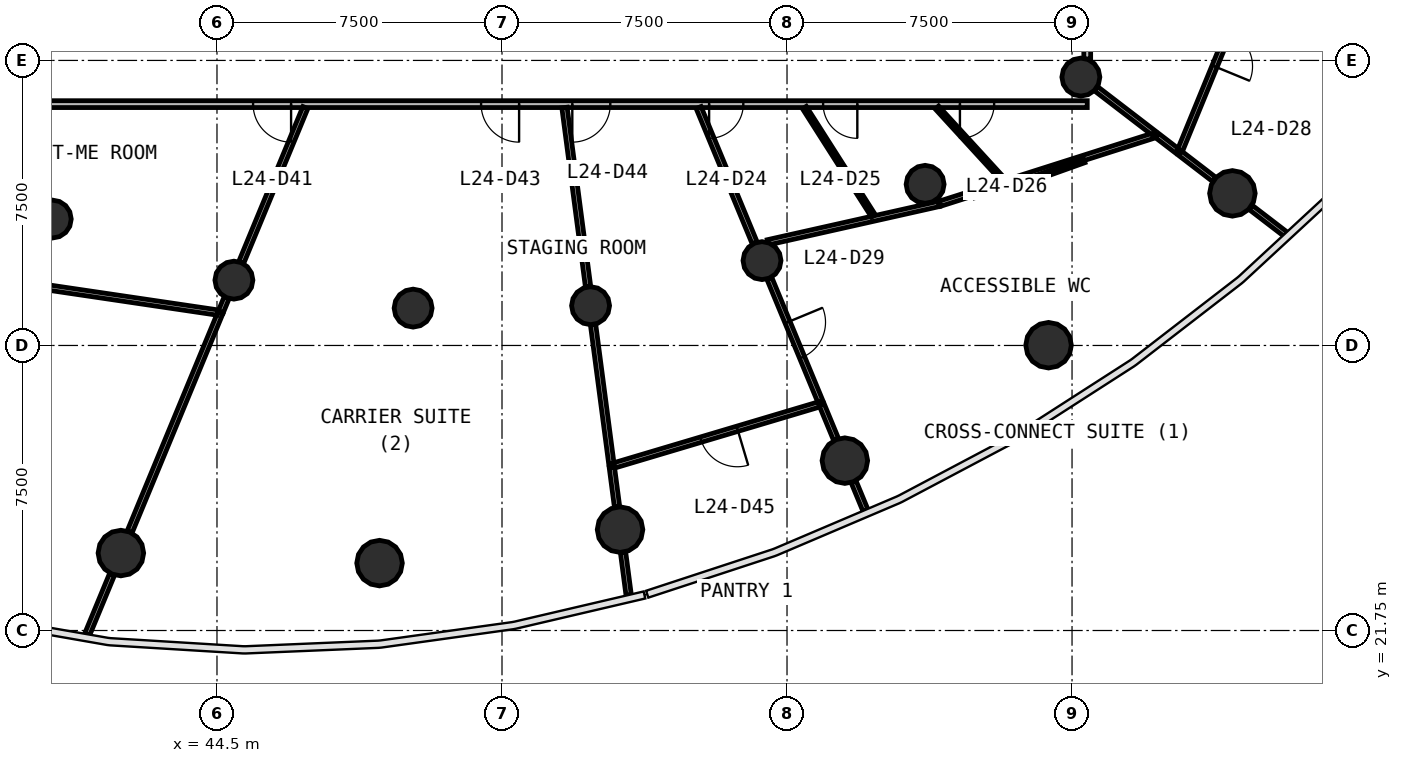
"""IFC4 building model, lengths in metres.
Left out: names, types, materials, properties, quantities, classifications, styles, units other than length and angle.
Written with IfcOpenShell. Run it as: python <this file> out.ifc"""

import sys

from ifc_helpers import new_model, si_unit, direction, frame, frame_2d, origin, origin_2d, place, context, subcontext, project, spatial, rectangle, circle, extrude, source, transform, mapped, element, fill, save


model = new_model("IFC4")
c1 = context("Model", 3, precision=1e-05, world=origin(), true_north=direction((0.0, 1.0)))
c2 = subcontext(c1, "Body", "Model", "MODEL_VIEW")
j1 = project(units=[si_unit("LENGTHUNIT", "METRE"), si_unit("PLANEANGLEUNIT", "RADIAN")], contexts=[c1])
p1 = place(None, origin())
s1 = spatial("IfcSite", under=j1, at=p1, CompositionType="ELEMENT")
p2 = place(p1, origin())
s2 = spatial("IfcBuilding", under=s1, at=p2, CompositionType="ELEMENT")
p3 = place(p2, frame((0.0, 0.0, 104.4)))
s3 = spatial("IfcBuildingStorey", under=s2, at=p3, CompositionType="ELEMENT", Elevation=104.4)
m1 = source(origin(), c2, "Body", "SweptSolid", [
    extrude(circle(Radius=0.6, at=origin_2d()), origin(), (0.0, 0.0, 1.0), 4.1),
])
for number, where, z_axis, x_axis in (
    (1, (41.971, 23.788, 0.0), (0.0, 0.0, 1.0), (1.0, 0.0, 0.0)),
    (2, (48.778, 23.523, 0.0), (0.0, 0.0, 1.0), (1.0, 0.0, 0.0)),
    (3, (55.106, 24.405, 0.0), (0.0, 0.0, 1.0), (1.0, 0.0, 0.0)),
    (4, (61.022, 26.219, 0.0), (0.0, 0.0, 1.0), (1.0, 0.0, 0.0)),
    (5, (66.382, 29.257, 0.0), (0.0, 0.0, 1.0), (1.0, 0.0, 0.0)),
    (6, (71.22, 33.252, 0.0), (0.0, 0.0, 1.0), (1.0, 0.0, 0.0)),
):
    element("IfcColumn", number, at=place(p3, frame(where, z_axis=z_axis, x_axis=x_axis)), inside=s3, PredefinedType="COLUMN", context=c2, shape_type="MappedRepresentation", body=[
        mapped(m1, transform((0.0, 0.0, 0.0), scale=1.0)),
    ])
m2 = source(origin(), c2, "Body", "SweptSolid", [
    extrude(circle(Radius=0.5, at=origin_2d()), origin(), (0.0, 0.0, 1.0), 4.1),
])
for number, where, z_axis, x_axis in (
    (7, (40.165, 32.576, 0.0), (0.0, 0.0, 1.0), (1.0, 0.0, 0.0)),
    (8, (44.945, 30.969, 0.0), (0.0, 0.0, 1.0), (1.0, 0.0, 0.0)),
    (9, (49.661, 30.233, 0.0), (0.0, 0.0, 1.0), (1.0, 0.0, 0.0)),
    (10, (54.331, 30.297, 0.0), (0.0, 0.0, 1.0), (1.0, 0.0, 0.0)),
    (11, (58.842, 31.482, 0.0), (0.0, 0.0, 1.0), (1.0, 0.0, 0.0)),
    (12, (63.134, 33.49, 0.0), (0.0, 0.0, 1.0), (1.0, 0.0, 0.0)),
    (13, (67.232, 36.312, 0.0), (0.0, 0.0, 1.0), (1.0, 0.0, 0.0)),
):
    element("IfcColumn", number, at=place(p3, frame(where, z_axis=z_axis, x_axis=x_axis)), inside=s3, PredefinedType="COLUMN", context=c2, shape_type="MappedRepresentation", body=[
        mapped(m2, transform((0.0, 0.0, 0.0), scale=1.0)),
    ])
p4 = place(p3, frame((67.4, 35.6, 0.0), z_axis=(0.0, 0.0, 1.0), x_axis=(-1.0, 0.0, 0.0)))
e14 = element("IfcWall", 14, at=p4, inside=s3, PredefinedType="PARTITIONING", context=c2, shape_type="SweptSolid", body=[
    extrude(rectangle(XDim=30.8, YDim=0.18, at=frame_2d((15.4, 0.0))), origin(), (0.0, 0.0, 1.0), 2.9),
])
p5 = place(p4, frame((9.05, 0.0, 0.0)))
e15 = element("IfcOpeningElement", 15, at=p5, cuts=e14, PredefinedType="OPENING", context=c2, shape_type="SweptSolid", body=[
    extrude(rectangle(XDim=0.9, YDim=2.1, at=frame_2d((0.45, 1.05))), frame((0.0, 0.1, 0.0), z_axis=(0.0, -1.0, 0.0), x_axis=(1.0, 0.0, 0.0)), (0.0, 0.0, 1.0), 0.2),
])
p6 = place(p4, frame((6.05, 0.0, 0.0)))
e16 = element("IfcOpeningElement", 16, at=p6, cuts=e14, PredefinedType="OPENING", context=c2, shape_type="SweptSolid", body=[
    extrude(rectangle(XDim=0.9, YDim=2.1, at=frame_2d((0.45, 1.05))), frame((0.0, 0.1, 0.0), z_axis=(0.0, -1.0, 0.0), x_axis=(1.0, 0.0, 0.0)), (0.0, 0.0, 1.0), 0.2),
])
p7 = place(p4, frame((2.45, 0.0, 0.0)))
e17 = element("IfcOpeningElement", 17, at=p7, cuts=e14, PredefinedType="OPENING", context=c2, shape_type="SweptSolid", body=[
    extrude(rectangle(XDim=0.9, YDim=2.1, at=frame_2d((0.45, 1.05))), frame((0.0, 0.1, 0.0), z_axis=(0.0, -1.0, 0.0), x_axis=(1.0, 0.0, 0.0)), (0.0, 0.0, 1.0), 0.2),
])
p8 = place(p4, frame((20.95, 0.0, 0.0)))
e18 = element("IfcOpeningElement", 18, at=p8, cuts=e14, PredefinedType="OPENING", context=c2, shape_type="SweptSolid", body=[
    extrude(rectangle(XDim=1.0, YDim=2.1, at=frame_2d((0.5, 1.05))), frame((0.0, 0.1, 0.0), z_axis=(0.0, -1.0, 0.0), x_axis=(1.0, 0.0, 0.0)), (0.0, 0.0, 1.0), 0.2),
])
p9 = place(p4, frame((14.95, 0.0, 0.0)))
e19 = element("IfcOpeningElement", 19, at=p9, cuts=e14, PredefinedType="OPENING", context=c2, shape_type="SweptSolid", body=[
    extrude(rectangle(XDim=1.0, YDim=2.1, at=frame_2d((0.5, 1.05))), frame((0.0, 0.1, 0.0), z_axis=(0.0, -1.0, 0.0), x_axis=(1.0, 0.0, 0.0)), (0.0, 0.0, 1.0), 0.2),
])
p10 = place(p4, frame((12.55, 0.0, 0.0)))
e20 = element("IfcOpeningElement", 20, at=p10, cuts=e14, PredefinedType="OPENING", context=c2, shape_type="SweptSolid", body=[
    extrude(rectangle(XDim=1.0, YDim=2.1, at=frame_2d((0.5, 1.05))), frame((0.0, 0.1, 0.0), z_axis=(0.0, -1.0, 0.0), x_axis=(1.0, 0.0, 0.0)), (0.0, 0.0, 1.0), 0.2),
])
p11 = place(p3, frame((67.4, 60.37, 0.0), z_axis=(0.0, 0.0, 1.0), x_axis=(0.0, -1.0, 0.0)))
e21 = element("IfcWall", 21, at=p11, inside=s3, PredefinedType="PARTITIONING", context=c2, shape_type="SweptSolid", body=[
    extrude(rectangle(XDim=23.583, YDim=0.18, at=frame_2d((11.791, 0.0))), origin(), (0.0, 0.0, 1.0), 2.9),
])
p12 = place(p11, frame((14.732, 0.0, 0.0)))
e22 = element("IfcOpeningElement", 22, at=p12, cuts=e21, PredefinedType="OPENING", context=c2, shape_type="SweptSolid", body=[
    extrude(rectangle(XDim=1.0, YDim=2.1, at=frame_2d((0.5, 1.05))), frame((0.0, 0.1, 0.0), z_axis=(0.0, -1.0, 0.0), x_axis=(1.0, 0.0, 0.0)), (0.0, 0.0, 1.0), 0.2),
])
p13 = place(p11, frame((11.333, 0.0, 0.0)))
e23 = element("IfcOpeningElement", 23, at=p13, cuts=e21, PredefinedType="OPENING", context=c2, shape_type="SweptSolid", body=[
    extrude(rectangle(XDim=1.0, YDim=2.1, at=frame_2d((0.5, 1.05))), frame((0.0, 0.1, 0.0), z_axis=(0.0, -1.0, 0.0), x_axis=(1.0, 0.0, 0.0)), (0.0, 0.0, 1.0), 0.2),
])
p14 = place(p11, frame((4.532, 0.0, 0.0)))
e24 = element("IfcOpeningElement", 24, at=p14, cuts=e21, PredefinedType="OPENING", context=c2, shape_type="SweptSolid", body=[
    extrude(rectangle(XDim=1.0, YDim=2.1, at=frame_2d((0.5, 1.05))), frame((0.0, 0.1, 0.0), z_axis=(0.0, -1.0, 0.0), x_axis=(1.0, 0.0, 0.0)), (0.0, 0.0, 1.0), 0.2),
])
p15 = place(p3, frame((44.588, 30.106, 0.0), z_axis=(0.0, 0.0, 1.0), x_axis=(-0.382687319502, -0.923877922397, 0.0)))
e25 = element("IfcWall", 25, at=p15, inside=s3, PredefinedType="PARTITIONING", context=c2, shape_type="SweptSolid", body=[
    extrude(rectangle(XDim=6.234, YDim=0.14, at=frame_2d((3.117, 0.0))), origin(), (0.0, 0.0, 1.0), 2.9),
])
p16 = place(p3, frame((63.525, 32.98, 0.0), z_axis=(0.0, 0.0, 1.0), x_axis=(0.952796236259, 0.303610494172, 0.0)))
e26 = element("IfcWall", 26, at=p16, inside=s3, PredefinedType="PARTITIONING", context=c2, shape_type="SweptSolid", body=[
    extrude(rectangle(XDim=5.969, YDim=0.14, at=frame_2d((2.984, 0.0))), origin(), (0.0, 0.0, 1.0), 2.9),
])
p17 = place(p3, frame((72.028, 39.704, 0.0), z_axis=(0.0, 0.0, 1.0), x_axis=(-0.380042060719, -0.92496920602, 0.0)))
e27 = element("IfcWall", 27, at=p17, inside=s3, PredefinedType="PARTITIONING", context=c2, shape_type="SweptSolid", body=[
    extrude(rectangle(XDim=5.813, YDim=0.14, at=frame_2d((2.907, 0.0))), origin(), (0.0, 0.0, 1.0), 2.9),
])
p18 = place(p17, frame((2.363, 0.0, 0.0)))
e28 = element("IfcOpeningElement", 28, at=p18, cuts=e27, PredefinedType="OPENING", context=c2, shape_type="SweptSolid", body=[
    extrude(rectangle(XDim=1.0, YDim=2.1, at=frame_2d((0.5, 1.05))), frame((0.0, 0.08, 0.0), z_axis=(0.0, -1.0, 0.0), x_axis=(1.0, 0.0, 0.0)), (0.0, 0.0, 1.0), 0.16),
])
p19 = place(p3, frame((60.402, 27.716, 0.0), z_axis=(0.0, 0.0, 1.0), x_axis=(-0.958396549516, -0.285440105584, 0.0)))
e29 = element("IfcWall", 29, at=p19, inside=s3, PredefinedType="PARTITIONING", context=c2, shape_type="SweptSolid", body=[
    extrude(rectangle(XDim=5.755, YDim=0.14, at=frame_2d((2.877, 0.0))), origin(), (0.0, 0.0, 1.0), 2.9),
])
p20 = place(p19, frame((2.304, 0.0, 0.0)))
e30 = element("IfcOpeningElement", 30, at=p20, cuts=e29, PredefinedType="OPENING", context=c2, shape_type="SweptSolid", body=[
    extrude(rectangle(XDim=1.0, YDim=2.1, at=frame_2d((0.5, 1.05))), frame((0.0, 0.08, 0.0), z_axis=(0.0, -1.0, 0.0), x_axis=(1.0, 0.0, 0.0)), (0.0, 0.0, 1.0), 0.16),
])
p21 = place(p3, frame((38.943, 30.94, 0.0), z_axis=(0.0, 0.0, 1.0), x_axis=(0.98924251215, -0.146284832283, 0.0)))
e31 = element("IfcWall", 31, at=p21, inside=s3, PredefinedType="PARTITIONING", context=c2, shape_type="SweptSolid", body=[
    extrude(rectangle(XDim=5.634, YDim=0.14, at=frame_2d((2.817, 0.0))), origin(), (0.0, 0.0, 1.0), 2.9),
])
p22 = place(p3, frame((53.644, 35.51, 0.0), z_axis=(0.0, 0.0, 1.0), x_axis=(0.130548834981, -0.991441880135, 0.0)))
e32 = element("IfcWall", 32, at=p22, inside=s3, PredefinedType="PARTITIONING", context=c2, shape_type="SweptSolid", body=[
    extrude(rectangle(XDim=4.754, YDim=0.14, at=frame_2d((2.377, 0.0))), origin(), (0.0, 0.0, 1.0), 2.9),
])
p23 = place(p3, frame((58.994, 31.964, 0.0), z_axis=(0.0, 0.0, 1.0), x_axis=(0.975726638185, 0.218992071856, 0.0)))
e33 = element("IfcWall", 33, at=p23, inside=s3, PredefinedType="PARTITIONING", context=c2, shape_type="SweptSolid", body=[
    extrude(rectangle(XDim=4.613, YDim=0.14, at=frame_2d((2.307, 0.0))), origin(), (0.0, 0.0, 1.0), 2.9),
])
p24 = place(p3, frame((46.826, 35.51, 0.0), z_axis=(0.0, 0.0, 1.0), x_axis=(-0.382672831764, -0.923883923353, 0.0)))
e34 = element("IfcWall", 34, at=p24, inside=s3, PredefinedType="PARTITIONING", context=c2, shape_type="SweptSolid", body=[
    extrude(rectangle(XDim=4.41, YDim=0.14, at=frame_2d((2.205, 0.0))), origin(), (0.0, 0.0, 1.0), 2.9),
])
p25 = place(p3, frame((57.174, 35.51, 0.0), z_axis=(0.0, 0.0, 1.0), x_axis=(0.382644558062, -0.923895633817, 0.0)))
e35 = element("IfcWall", 35, at=p25, inside=s3, PredefinedType="PARTITIONING", context=c2, shape_type="SweptSolid", body=[
    extrude(rectangle(XDim=3.854, YDim=0.14, at=frame_2d((1.927, 0.0))), origin(), (0.0, 0.0, 1.0), 2.9),
])
p26 = place(p3, frame((54.396, 29.797, 0.0), z_axis=(0.0, 0.0, 1.0), x_axis=(0.13054879449, -0.991441885466, 0.0)))
e36 = element("IfcWall", 36, at=p26, inside=s3, PredefinedType="PARTITIONING", context=c2, shape_type="SweptSolid", body=[
    extrude(rectangle(XDim=3.684, YDim=0.14, at=frame_2d((1.842, 0.0))), origin(), (0.0, 0.0, 1.0), 2.9),
])
p27 = place(p3, frame((59.035, 31.016, 0.0), z_axis=(0.0, 0.0, 1.0), x_axis=(0.382713118167, -0.923867235691, 0.0)))
e37 = element("IfcWall", 37, at=p27, inside=s3, PredefinedType="PARTITIONING", context=c2, shape_type="SweptSolid", body=[
    extrude(rectangle(XDim=3.501, YDim=0.14, at=frame_2d((1.75, 0.0))), origin(), (0.0, 0.0, 1.0), 2.9),
])
p28 = place(p27, frame((1.25, 0.0, 0.0)))
e38 = element("IfcOpeningElement", 38, at=p28, cuts=e37, PredefinedType="OPENING", context=c2, shape_type="SweptSolid", body=[
    extrude(rectangle(XDim=1.0, YDim=2.1, at=frame_2d((0.5, 1.05))), frame((0.0, 0.08, 0.0), z_axis=(0.0, -1.0, 0.0), x_axis=(1.0, 0.0, 0.0)), (0.0, 0.0, 1.0), 0.16),
])
p29 = place(p3, frame((67.633, 36.005, 0.0), z_axis=(0.0, 0.0, 1.0), x_axis=(0.79330932609, -0.608818785139, 0.0)))
e39 = element("IfcWall", 39, at=p29, inside=s3, PredefinedType="PARTITIONING", context=c2, shape_type="SweptSolid", body=[
    extrude(rectangle(XDim=1.906, YDim=0.14, at=frame_2d((0.953, 0.0))), origin(), (0.0, 0.0, 1.0), 2.9),
])
p30 = place(p3, frame((41.74, 23.229, 0.0), z_axis=(0.0, 0.0, 1.0), x_axis=(-0.382769756697, -0.923843771077, 0.0)))
e40 = element("IfcWall", 40, at=p30, inside=s3, PredefinedType="PARTITIONING", context=c2, shape_type="SweptSolid", body=[
    extrude(rectangle(XDim=1.719, YDim=0.14, at=frame_2d((0.86, 0.0))), origin(), (0.0, 0.0, 1.0), 2.9),
])
p31 = place(p3, frame((71.699, 32.884, 0.0), z_axis=(0.0, 0.0, 1.0), x_axis=(0.793332880396, -0.608788091935, 0.0)))
e41 = element("IfcWall", 41, at=p31, inside=s3, PredefinedType="PARTITIONING", context=c2, shape_type="SweptSolid", body=[
    extrude(rectangle(XDim=1.164, YDim=0.14, at=frame_2d((0.582, 0.0))), origin(), (0.0, 0.0, 1.0), 2.9),
])
for number, where, z_axis, x_axis in (
    (42, (69.843, 34.309, 0.0), (0.0, 0.0, 1.0), (0.793, -0.609, 0.0)),
    (43, (55.185, 23.805, 0.0), (0.0, 0.0, 1.0), (0.131, -0.991, 0.0)),
):
    element("IfcWall", number, at=place(p3, frame(where, z_axis=z_axis, x_axis=x_axis)), inside=s3, PredefinedType="PARTITIONING", context=c2, shape_type="SweptSolid", body=[
        extrude(rectangle(XDim=1.131, YDim=0.14, at=frame_2d((0.566, 0.0))), origin(), (0.0, 0.0, 1.0), 2.9),
    ])
p32 = place(p3, frame((54.891, 26.044, 0.0), z_axis=(0.0, 0.0, 1.0), x_axis=(0.130562877322, -0.991440030998, 0.0)))
e44 = element("IfcWall", 44, at=p32, inside=s3, PredefinedType="PARTITIONING", context=c2, shape_type="SweptSolid", body=[
    extrude(rectangle(XDim=1.049, YDim=0.14, at=frame_2d((0.524, 0.0))), origin(), (0.0, 0.0, 1.0), 2.9),
])
p33 = place(p3, frame((60.413, 27.689, 0.0), z_axis=(0.0, 0.0, 1.0), x_axis=(0.382767514508, -0.923844700065, 0.0)))
e45 = element("IfcWall", 45, at=p33, inside=s3, PredefinedType="PARTITIONING", context=c2, shape_type="SweptSolid", body=[
    extrude(rectangle(XDim=0.985, YDim=0.14, at=frame_2d((0.493, 0.0))), origin(), (0.0, 0.0, 1.0), 2.9),
])
p34 = place(p3, frame((61.253, 25.66, 0.0), z_axis=(0.0, 0.0, 1.0), x_axis=(0.382520140646, -0.923947153251, 0.0)))
e46 = element("IfcWall", 46, at=p34, inside=s3, PredefinedType="PARTITIONING", context=c2, shape_type="SweptSolid", body=[
    extrude(rectangle(XDim=0.811, YDim=0.14, at=frame_2d((0.406, 0.0))), origin(), (0.0, 0.0, 1.0), 2.9),
])
p35 = place(p3, frame((69.236, 34.774, 0.0), z_axis=(0.0, 0.0, 1.0), x_axis=(0.793363129336, -0.608748671465, 0.0)))
e47 = element("IfcWall", 47, at=p35, inside=s3, PredefinedType="PARTITIONING", context=c2, shape_type="SweptSolid", body=[
    extrude(rectangle(XDim=0.663, YDim=0.14, at=frame_2d((0.331, 0.0))), origin(), (0.0, 0.0, 1.0), 2.9),
])
p36 = place(p3, frame((44.752, 30.502, 0.0), z_axis=(0.0, 0.0, 1.0), x_axis=(-0.382441868588, -0.923979554509, 0.0)))
e48 = element("IfcWall", 48, at=p36, inside=s3, PredefinedType="PARTITIONING", context=c2, shape_type="SweptSolid", body=[
    extrude(rectangle(XDim=0.399, YDim=0.14, at=frame_2d((0.199, 0.0))), origin(), (0.0, 0.0, 1.0), 2.9),
])
p37 = place(p3, frame((65.363, 33.417, 0.0), z_axis=(0.0, 0.0, 1.0), x_axis=(0.941622213284, 0.336671364166, 0.0)))
e49 = element("IfcWall", 49, at=p37, inside=s3, PredefinedType="PARTITIONING", context=c2, shape_type="SweptSolid", body=[
    extrude(rectangle(XDim=2.078, YDim=0.12, at=frame_2d((1.039, 0.0))), origin(), (0.0, 0.0, 1.0), 2.9),
])
p38 = place(p3, frame((59.957, 35.51, 0.0), z_axis=(0.0, 0.0, 1.0), x_axis=(0.53729604105, -0.843393718421, 0.0)))
e50 = element("IfcWall", 50, at=p38, inside=s3, PredefinedType="PARTITIONING", context=c2, shape_type="SweptSolid", body=[
    extrude(rectangle(XDim=3.38, YDim=0.12, at=frame_2d((1.69, 0.0))), origin(), (0.0, 0.0, 1.0), 2.9),
])
p39 = place(p3, frame((63.445, 35.51, 0.0), z_axis=(0.0, 0.0, 1.0), x_axis=(0.675550604447, -0.737313624471, 0.0)))
e51 = element("IfcWall", 51, at=p39, inside=s3, PredefinedType="PARTITIONING", context=c2, shape_type="SweptSolid", body=[
    extrude(rectangle(XDim=2.605, YDim=0.12, at=frame_2d((1.302, 0.0))), origin(), (0.0, 0.0, 1.0), 2.9),
])
p40 = place(p3, frame((64.429, 33.195, 0.0), z_axis=(0.0, 0.0, 1.0), x_axis=(0.972960885816, 0.230969943221, 0.0)))
e52 = element("IfcWall", 52, at=p40, inside=s3, PredefinedType="PARTITIONING", context=c2, shape_type="SweptSolid", body=[
    extrude(rectangle(XDim=0.93, YDim=0.12, at=frame_2d((0.465, 0.0))), origin(), (0.0, 0.0, 1.0), 2.9),
])
m3 = source(origin(), c2, "Body", "SweptSolid", [
    extrude(rectangle(XDim=0.9, YDim=2.1, at=frame_2d((0.45, 1.05))), frame((0.0, 0.025, 0.0), z_axis=(0.0, -1.0, 0.0), x_axis=(1.0, 0.0, 0.0)), (0.0, 0.0, 1.0), 0.05),
])
p41 = place(p5, origin())
e53 = element("IfcDoor", 53, at=p41, inside=s3, OperationType="SINGLE_SWING_RIGHT", PredefinedType="DOOR", context=c2, shape_type="MappedRepresentation", body=[
    mapped(m3, transform((0.0, 0.0, 0.0), scale=1.0)),
])
fill(e15, e53)
p42 = place(p6, origin())
e54 = element("IfcDoor", 54, at=p42, inside=s3, OperationType="SINGLE_SWING_LEFT", PredefinedType="DOOR", context=c2, shape_type="MappedRepresentation", body=[
    mapped(m3, transform((0.0, 0.0, 0.0), scale=1.0)),
])
fill(e16, e54)
p43 = place(p7, origin())
e55 = element("IfcDoor", 55, at=p43, inside=s3, OperationType="SINGLE_SWING_RIGHT", PredefinedType="DOOR", context=c2, shape_type="MappedRepresentation", body=[
    mapped(m3, transform((0.0, 0.0, 0.0), scale=1.0)),
])
fill(e17, e55)
m4 = source(origin(), c2, "Body", "SweptSolid", [
    extrude(rectangle(XDim=1.0, YDim=2.1, at=frame_2d((0.5, 1.05))), frame((0.0, 0.025, 0.0), z_axis=(0.0, -1.0, 0.0), x_axis=(1.0, 0.0, 0.0)), (0.0, 0.0, 1.0), 0.05),
])
p44 = place(p18, origin())
e56 = element("IfcDoor", 56, at=p44, inside=s3, OperationType="SINGLE_SWING_RIGHT", PredefinedType="DOOR", context=c2, shape_type="MappedRepresentation", body=[
    mapped(m4, transform((0.0, 0.0, 0.0), scale=1.0)),
])
fill(e28, e56)
p45 = place(p28, origin())
e57 = element("IfcDoor", 57, at=p45, inside=s3, OperationType="SINGLE_SWING_LEFT", PredefinedType="DOOR", context=c2, shape_type="MappedRepresentation", body=[
    mapped(m4, transform((0.0, 0.0, 0.0), scale=1.0)),
])
fill(e38, e57)
p46 = place(p8, origin())
e58 = element("IfcDoor", 58, at=p46, inside=s3, OperationType="SINGLE_SWING_LEFT", PredefinedType="DOOR", context=c2, shape_type="MappedRepresentation", body=[
    mapped(m4, transform((0.0, 0.0, 0.0), scale=1.0)),
])
fill(e18, e58)
p47 = place(p9, origin())
e59 = element("IfcDoor", 59, at=p47, inside=s3, OperationType="SINGLE_SWING_LEFT", PredefinedType="DOOR", context=c2, shape_type="MappedRepresentation", body=[
    mapped(m4, transform((0.0, 0.0, 0.0), scale=1.0)),
])
fill(e19, e59)
p48 = place(p10, origin())
e60 = element("IfcDoor", 60, at=p48, inside=s3, OperationType="SINGLE_SWING_RIGHT", PredefinedType="DOOR", context=c2, shape_type="MappedRepresentation", body=[
    mapped(m4, transform((0.0, 0.0, 0.0), scale=1.0)),
])
fill(e20, e60)
p49 = place(p20, origin())
e61 = element("IfcDoor", 61, at=p49, inside=s3, OperationType="SINGLE_SWING_LEFT", PredefinedType="DOOR", context=c2, shape_type="MappedRepresentation", body=[
    mapped(m4, transform((0.0, 0.0, 0.0), scale=1.0)),
])
fill(e30, e61)
save(model, sys.argv[1])
